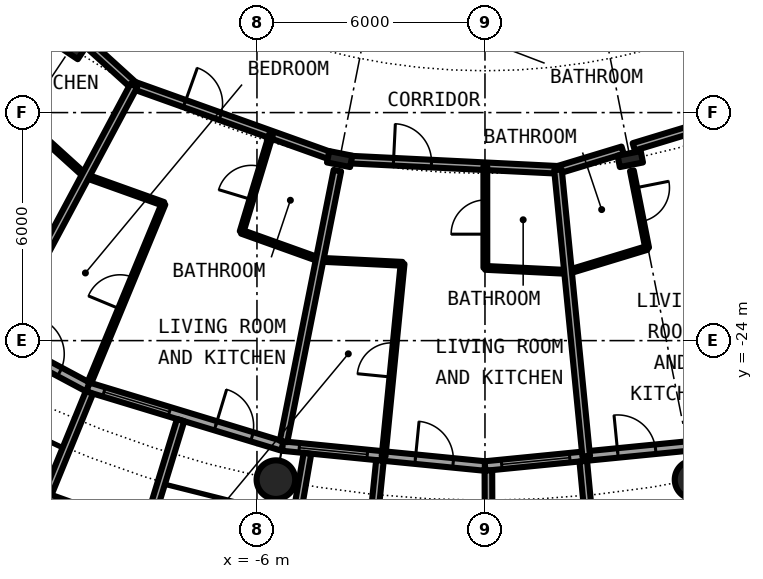
"""IFC4 building model, lengths in metres.
Left out: names, types, materials, properties, quantities, classifications, styles, units other than length and angle.
Written with IfcOpenShell. Run it as: python <this file> out.ifc"""

import sys

from ifc_helpers import new_model, si_unit, direction, frame, frame_2d, origin, origin_2d, place, context, subcontext, project, spatial, rectangle, circle, hollow_circle, i_section, extrude, element, fill, save


model = new_model("IFC4")
c1 = context("Model", 3, precision=1e-05, world=origin(), true_north=direction((0.0, 1.0)))
c2 = subcontext(c1, "Body", "Model", "MODEL_VIEW")
j1 = project(units=[si_unit("LENGTHUNIT", "METRE"), si_unit("PLANEANGLEUNIT", "RADIAN")], contexts=[c1])
p1 = place(None, origin())
s1 = spatial("IfcSite", under=j1, at=p1, CompositionType="ELEMENT")
p2 = place(p1, origin())
s2 = spatial("IfcBuilding", under=s1, at=p2, CompositionType="ELEMENT")
p3 = place(p2, frame((0.0, 0.0, 41.1)))
s3 = spatial("IfcBuildingStorey", under=s2, at=p3, CompositionType="ELEMENT", Elevation=41.1)
for number, where, z_axis, x_axis in (
    (1, (-5.501, -27.658, 0.0), (0.0, 0.0, 1.0), (1.0, 0.0, 0.0)),
    (2, (5.501, -27.658, 0.0), (0.0, 0.0, 1.0), (1.0, 0.0, 0.0)),
):
    element("IfcColumn", number, at=place(p3, frame(where, z_axis=z_axis, x_axis=x_axis)), inside=s3, PredefinedType="COLUMN", context=c2, shape_type="SweptSolid", body=[
        extrude(hollow_circle(Radius=0.508, WallThickness=0.05, at=origin_2d()), origin(), (0.0, 0.0, 1.0), 3.05),
    ])
for number, where, z_axis, x_axis in (
    (3, (-10.889, -16.297, 0.0), (0.0, 0.0, 1.0), (-0.556, -0.831, 0.0)),
    (4, (-3.824, -19.223, 0.0), (0.0, 0.0, 1.0), (-0.195, -0.981, 0.0)),
    (5, (3.824, -19.223, 0.0), (0.0, 0.0, 1.0), (0.195, -0.981, 0.0)),
):
    element("IfcColumn", number, at=place(p3, frame(where, z_axis=z_axis, x_axis=x_axis)), inside=s3, PredefinedType="COLUMN", context=c2, shape_type="SweptSolid", body=[
        extrude(i_section(OverallWidth=0.305, OverallDepth=0.62, WebThickness=0.021, FlangeThickness=0.04, FilletRadius=0.027, at=origin_2d()), origin(), (0.0, 0.0, 1.0), 3.05),
    ])
p4 = place(p3, frame((-15.167, -22.699, 0.0), z_axis=(0.0, 0.0, 1.0), x_axis=(0.881915646801, -0.471407246368, 0.0)))
e6 = element("IfcWall", 6, at=p4, inside=s3, PredefinedType="SOLIDWALL", context=c2, shape_type="SweptSolid", body=[
    extrude(rectangle(XDim=5.352, YDim=0.25, at=frame_2d((2.676, 0.0))), origin(), (0.0, 0.0, 1.0), 2.7),
])
p5 = place(p4, frame((0.441, 0.0, 0.3)))
e7 = element("IfcOpeningElement", 7, at=p5, cuts=e6, PredefinedType="OPENING", context=c2, shape_type="SweptSolid", body=[
    extrude(rectangle(XDim=1.8, YDim=2.1, at=frame_2d((0.9, 1.05))), frame((0.0, 0.135, 0.0), z_axis=(0.0, -1.0, 0.0), x_axis=(1.0, 0.0, 0.0)), (0.0, 0.0, 1.0), 0.27),
])
p6 = place(p4, frame((3.51, 0.0, 0.0)))
e8 = element("IfcOpeningElement", 8, at=p6, cuts=e6, PredefinedType="OPENING", context=c2, shape_type="SweptSolid", body=[
    extrude(rectangle(XDim=1.0, YDim=2.2, at=frame_2d((0.5, 1.1))), frame((0.0, 0.135, 0.0), z_axis=(0.0, -1.0, 0.0), x_axis=(1.0, 0.0, 0.0)), (0.0, 0.0, 1.0), 0.27),
])
p7 = place(p3, frame((-10.447, -25.222, 0.0), z_axis=(0.0, 0.0, 1.0), x_axis=(0.956965678721, -0.290201119486, 0.0)))
e9 = element("IfcWall", 9, at=p7, inside=s3, PredefinedType="SOLIDWALL", context=c2, shape_type="SweptSolid", body=[
    extrude(rectangle(XDim=5.351, YDim=0.25, at=frame_2d((2.676, 0.0))), origin(), (0.0, 0.0, 1.0), 2.7),
])
p8 = place(p7, frame((0.441, 0.0, 0.3)))
e10 = element("IfcOpeningElement", 10, at=p8, cuts=e9, PredefinedType="OPENING", context=c2, shape_type="SweptSolid", body=[
    extrude(rectangle(XDim=1.8, YDim=2.1, at=frame_2d((0.9, 1.05))), frame((0.0, 0.135, 0.0), z_axis=(0.0, -1.0, 0.0), x_axis=(1.0, 0.0, 0.0)), (0.0, 0.0, 1.0), 0.27),
])
p9 = place(p7, frame((3.51, 0.0, 0.0)))
e11 = element("IfcOpeningElement", 11, at=p9, cuts=e9, PredefinedType="OPENING", context=c2, shape_type="SweptSolid", body=[
    extrude(rectangle(XDim=1.0, YDim=2.2, at=frame_2d((0.5, 1.1))), frame((0.0, 0.135, 0.0), z_axis=(0.0, -1.0, 0.0), x_axis=(1.0, 0.0, 0.0)), (0.0, 0.0, 1.0), 0.27),
])
p10 = place(p3, frame((-11.638, -28.084, -0.03), z_axis=(0.0, 0.0, 1.0), x_axis=(0.941461077774, -0.337121697664, 0.0)))
e12 = element("IfcWall", 12, at=p10, inside=s3, PredefinedType="SOLIDWALL", context=c2, shape_type="SweptSolid", body=[
    extrude(rectangle(XDim=2.993, YDim=0.2, at=frame_2d((1.497, 0.0))), origin(), (0.0, 0.0, 1.0), 2.73),
])
p11 = place(p10, frame((0.457, 0.0, 0.33)))
e13 = element("IfcOpeningElement", 13, at=p11, cuts=e12, PredefinedType="OPENING", context=c2, shape_type="SweptSolid", body=[
    extrude(circle(Radius=1.04, at=frame_2d((1.04, 1.04))), frame((0.0, 0.11, 0.0), z_axis=(0.0, -1.0, 0.0), x_axis=(1.0, 0.0, 0.0)), (0.0, 0.0, 1.0), 0.22),
])
p12 = place(p3, frame((-10.409, -25.364, -0.03), z_axis=(0.0, 0.0, 1.0), x_axis=(-0.379509886562, -0.925187681501, 0.0)))
e14 = element("IfcWall", 14, at=p12, inside=s3, PredefinedType="SOLIDWALL", context=c2, shape_type="SweptSolid", body=[
    extrude(rectangle(XDim=2.883, YDim=0.2, at=frame_2d((1.441, 0.0))), origin(), (0.0, 0.0, 1.0), 2.73),
])
p13 = place(p3, frame((-8.009, -26.092, -0.03), z_axis=(0.0, 0.0, 1.0), x_axis=(-0.293406695073, -0.955987715029, 0.0)))
e15 = element("IfcWall", 15, at=p13, inside=s3, PredefinedType="SOLIDWALL", context=c2, shape_type="SweptSolid", body=[
    extrude(rectangle(XDim=3.006, YDim=0.2, at=frame_2d((1.503, 0.0))), origin(), (0.0, 0.0, 1.0), 2.73),
])
p14 = place(p3, frame((-5.326, -26.775, 0.0), z_axis=(0.0, 0.0, 1.0), x_axis=(0.995173996315, -0.098126026407, 0.0)))
e16 = element("IfcWall", 16, at=p14, inside=s3, PredefinedType="SOLIDWALL", context=c2, shape_type="SweptSolid", body=[
    extrude(rectangle(XDim=5.352, YDim=0.25, at=frame_2d((2.676, 0.0))), origin(), (0.0, 0.0, 1.0), 2.7),
])
p15 = place(p14, frame((0.441, 0.0, 0.3)))
e17 = element("IfcOpeningElement", 17, at=p15, cuts=e16, PredefinedType="OPENING", context=c2, shape_type="SweptSolid", body=[
    extrude(rectangle(XDim=1.8, YDim=2.1, at=frame_2d((0.9, 1.05))), frame((0.0, 0.135, 0.0), z_axis=(0.0, -1.0, 0.0), x_axis=(1.0, 0.0, 0.0)), (0.0, 0.0, 1.0), 0.27),
])
p16 = place(p14, frame((3.51, 0.0, 0.0)))
e18 = element("IfcOpeningElement", 18, at=p16, cuts=e16, PredefinedType="OPENING", context=c2, shape_type="SweptSolid", body=[
    extrude(rectangle(XDim=1.0, YDim=2.2, at=frame_2d((0.5, 1.1))), frame((0.0, 0.135, 0.0), z_axis=(0.0, -1.0, 0.0), x_axis=(1.0, 0.0, 0.0)), (0.0, 0.0, 1.0), 0.27),
])
p17 = place(p3, frame((-4.671, -26.966, -0.03), z_axis=(0.0, 0.0, 1.0), x_axis=(-0.170539878907, -0.985350774954, 0.0)))
e19 = element("IfcWall", 19, at=p17, inside=s3, PredefinedType="SOLIDWALL", context=c2, shape_type="SweptSolid", body=[
    extrude(rectangle(XDim=2.932, YDim=0.2, at=frame_2d((1.466, 0.0))), origin(), (0.0, 0.0, 1.0), 2.73),
])
p18 = place(p3, frame((-2.764, -27.153, -0.03), z_axis=(0.0, 0.0, 1.0), x_axis=(-0.101505487237, -0.994834979311, 0.0)))
e20 = element("IfcWall", 20, at=p18, inside=s3, PredefinedType="SOLIDWALL", context=c2, shape_type="SweptSolid", body=[
    extrude(rectangle(XDim=3.007, YDim=0.2, at=frame_2d((1.503, 0.0))), origin(), (0.0, 0.0, 1.0), 2.73),
])
p19 = place(p3, frame((0.0, -27.3, 0.0), z_axis=(0.0, 0.0, 1.0), x_axis=(0.995173996315, 0.098126026407, 0.0)))
e21 = element("IfcWall", 21, at=p19, inside=s3, PredefinedType="SOLIDWALL", context=c2, shape_type="SweptSolid", body=[
    extrude(rectangle(XDim=5.352, YDim=0.25, at=frame_2d((2.676, 0.0))), origin(), (0.0, 0.0, 1.0), 2.7),
])
p20 = place(p19, frame((0.441, 0.0, 0.3)))
e22 = element("IfcOpeningElement", 22, at=p20, cuts=e21, PredefinedType="OPENING", context=c2, shape_type="SweptSolid", body=[
    extrude(rectangle(XDim=1.8, YDim=2.1, at=frame_2d((0.9, 1.05))), frame((0.0, 0.135, 0.0), z_axis=(0.0, -1.0, 0.0), x_axis=(1.0, 0.0, 0.0)), (0.0, 0.0, 1.0), 0.27),
])
p21 = place(p19, frame((3.51, 0.0, 0.0)))
e23 = element("IfcOpeningElement", 23, at=p21, cuts=e21, PredefinedType="OPENING", context=c2, shape_type="SweptSolid", body=[
    extrude(rectangle(XDim=1.0, YDim=2.2, at=frame_2d((0.5, 1.1))), frame((0.0, 0.135, 0.0), z_axis=(0.0, -1.0, 0.0), x_axis=(1.0, 0.0, 0.0)), (0.0, 0.0, 1.0), 0.27),
])
p22 = place(p3, frame((0.09, -27.417, -0.03), z_axis=(0.0, 0.0, 1.0), x_axis=(0.00347308367, -0.999993968827, 0.0)))
e24 = element("IfcWall", 24, at=p22, inside=s3, PredefinedType="SOLIDWALL", context=c2, shape_type="SweptSolid", body=[
    extrude(rectangle(XDim=2.882, YDim=0.2, at=frame_2d((1.441, 0.0))), origin(), (0.0, 0.0, 1.0), 2.73),
])
p23 = place(p3, frame((2.586, -27.171, -0.03), z_axis=(0.0, 0.0, 1.0), x_axis=(0.094548432284, -0.995520262954, 0.0)))
e25 = element("IfcWall", 25, at=p23, inside=s3, PredefinedType="SOLIDWALL", context=c2, shape_type="SweptSolid", body=[
    extrude(rectangle(XDim=3.006, YDim=0.2, at=frame_2d((1.503, 0.0))), origin(), (0.0, 0.0, 1.0), 2.73),
])
p24 = place(p3, frame((-10.512, -19.667, 0.0), z_axis=(0.0, 0.0, 1.0), x_axis=(0.94151635689, -0.336967282847, 0.0)))
e26 = element("IfcWall", 26, at=p24, inside=s3, PredefinedType="PARTITIONING", context=c2, shape_type="SweptSolid", body=[
    extrude(rectangle(XDim=2.182, YDim=0.1, at=frame_2d((1.091, 0.0))), origin(), (0.0, 0.0, 1.0), 2.7),
])
p25 = place(p3, frame((-6.401, -21.138, 0.0), z_axis=(0.0, 0.0, 1.0), x_axis=(0.941465495635, -0.337109359895, 0.0)))
e27 = element("IfcWall", 27, at=p25, inside=s3, PredefinedType="PARTITIONING", context=c2, shape_type="SweptSolid", body=[
    extrude(rectangle(XDim=2.181, YDim=0.1, at=frame_2d((1.09, 0.0))), origin(), (0.0, 0.0, 1.0), 2.7),
])
for number, where, z_axis, x_axis in (
    (28, (-4.351, -21.872, 0.0), (0.0, 0.0, 1.0), (0.999, -0.049, 0.0)),
    (29, (0.007, -22.086, 0.0), (0.0, 0.0, 1.0), (0.999, -0.049, 0.0)),
):
    element("IfcWall", number, at=place(p3, frame(where, z_axis=z_axis, x_axis=x_axis)), inside=s3, PredefinedType="PARTITIONING", context=c2, shape_type="SweptSolid", body=[
        extrude(rectangle(XDim=2.182, YDim=0.1, at=frame_2d((1.091, 0.0))), origin(), (0.0, 0.0, 1.0), 2.7),
    ])
p26 = place(p3, frame((2.18, -22.195, 0.0), z_axis=(0.0, 0.0, 1.0), x_axis=(0.956838221976, 0.290621088303, 0.0)))
e30 = element("IfcWall", 30, at=p26, inside=s3, PredefinedType="PARTITIONING", context=c2, shape_type="SweptSolid", body=[
    extrude(rectangle(XDim=2.175, YDim=0.1, at=frame_2d((1.087, 0.0))), origin(), (0.0, 0.0, 1.0), 2.7),
])
p27 = place(p3, frame((-13.727, -16.754, 0.0), z_axis=(0.0, 0.0, 1.0), x_axis=(0.740840803797, -0.671680655839, 0.0)))
e31 = element("IfcWall", 31, at=p27, inside=s3, PredefinedType="PARTITIONING", context=c2, shape_type="SweptSolid", body=[
    extrude(rectangle(XDim=4.338, YDim=0.1, at=frame_2d((2.169, 0.0))), origin(), (0.0, 0.0, 1.0), 2.7),
])
p28 = place(p3, frame((-9.239, -17.286, 0.0), z_axis=(0.0, 0.0, 1.0), x_axis=(0.94157995483, -0.336789531699, 0.0)))
e32 = element("IfcWall", 32, at=p28, inside=s3, PredefinedType="PARTITIONING", context=c2, shape_type="SweptSolid", body=[
    extrude(rectangle(XDim=5.597, YDim=0.2, at=frame_2d((2.798, 0.0))), origin(), (0.0, 0.0, 1.0), 2.38),
])
p29 = place(p28, frame((1.417, 0.0, 0.0)))
e33 = element("IfcOpeningElement", 33, at=p29, cuts=e32, PredefinedType="OPENING", context=c2, shape_type="SweptSolid", body=[
    extrude(rectangle(XDim=1.0, YDim=2.3, at=frame_2d((0.5, 1.15))), frame((0.0, 0.11, 0.0), z_axis=(0.0, -1.0, 0.0), x_axis=(1.0, 0.0, 0.0)), (0.0, 0.0, 1.0), 0.22),
])
p30 = place(p3, frame((-3.67, -19.231, 0.0), z_axis=(0.0, 0.0, 1.0), x_axis=(0.99879118777, -0.049154483346, 0.0)))
e34 = element("IfcWall", 34, at=p30, inside=s3, PredefinedType="PARTITIONING", context=c2, shape_type="SweptSolid", body=[
    extrude(rectangle(XDim=5.598, YDim=0.2, at=frame_2d((2.799, 0.0))), origin(), (0.0, 0.0, 1.0), 2.38),
])
p31 = place(p30, frame((1.264, 0.0, 0.0)))
e35 = element("IfcOpeningElement", 35, at=p31, cuts=e34, PredefinedType="OPENING", context=c2, shape_type="SweptSolid", body=[
    extrude(rectangle(XDim=1.0, YDim=2.3, at=frame_2d((0.5, 1.15))), frame((0.0, 0.11, 0.0), z_axis=(0.0, -1.0, 0.0), x_axis=(1.0, 0.0, 0.0)), (0.0, 0.0, 1.0), 0.22),
])
p32 = place(p3, frame((1.921, -19.506, 0.0), z_axis=(0.0, 0.0, 1.0), x_axis=(0.956929641646, 0.290319928594, 0.0)))
e36 = element("IfcWall", 36, at=p32, inside=s3, PredefinedType="PARTITIONING", context=c2, shape_type="SweptSolid", body=[
    extrude(rectangle(XDim=1.778, YDim=0.2, at=frame_2d((0.889, 0.0))), origin(), (0.0, 0.0, 1.0), 2.38),
])
p33 = place(p3, frame((3.915, -18.901, 0.0), z_axis=(0.0, 0.0, 1.0), x_axis=(0.956941324682, 0.290281417103, 0.0)))
e37 = element("IfcWall", 37, at=p33, inside=s3, PredefinedType="PARTITIONING", context=c2, shape_type="SweptSolid", body=[
    extrude(rectangle(XDim=5.563, YDim=0.2, at=frame_2d((2.782, 0.0))), origin(), (0.0, 0.0, 1.0), 2.38),
])
p34 = place(p33, frame((2.196, 0.0, 0.0)))
e38 = element("IfcOpeningElement", 38, at=p34, cuts=e37, PredefinedType="OPENING", context=c2, shape_type="SweptSolid", body=[
    extrude(rectangle(XDim=1.0, YDim=2.3, at=frame_2d((0.5, 1.15))), frame((0.0, 0.11, 0.0), z_axis=(0.0, -1.0, 0.0), x_axis=(1.0, 0.0, 0.0)), (0.0, 0.0, 1.0), 0.22),
])
p35 = place(p3, frame((-16.179, -10.994, 0.0), z_axis=(0.0, 0.0, 1.0), x_axis=(0.740659568799, -0.671880497668, 0.0)))
e39 = element("IfcWall", 39, at=p35, inside=s3, PredefinedType="PARTITIONING", context=c2, shape_type="SweptSolid", body=[
    extrude(rectangle(XDim=9.36, YDim=0.2, at=frame_2d((4.68, 0.0))), origin(), (0.0, 0.0, 1.0), 2.38),
])
p36 = place(p35, frame((4.105, 0.0, 0.0)))
e40 = element("IfcOpeningElement", 40, at=p36, cuts=e39, PredefinedType="OPENING", context=c2, shape_type="SweptSolid", body=[
    extrude(rectangle(XDim=1.0, YDim=2.3, at=frame_2d((0.5, 1.15))), frame((0.0, 0.11, 0.0), z_axis=(0.0, -1.0, 0.0), x_axis=(1.0, 0.0, 0.0)), (0.0, 0.0, 1.0), 0.22),
])
p37 = place(p3, frame((-12.81, -23.966, 0.0), z_axis=(0.0, 0.0, 1.0), x_axis=(0.471439510802, 0.881898399848, 0.0)))
e41 = element("IfcWall", 41, at=p37, inside=s3, PredefinedType="PARTITIONING", context=c2, shape_type="SweptSolid", body=[
    extrude(rectangle(XDim=7.575, YDim=0.2, at=frame_2d((3.787, 0.0))), origin(), (0.0, 0.0, 1.0), 2.7),
])
p38 = place(p3, frame((-10.407, -25.103, 0.0), z_axis=(0.0, 0.0, 1.0), x_axis=(0.382983071721, 0.923755360891, 0.0)))
e42 = element("IfcWall", 42, at=p38, inside=s3, PredefinedType="PARTITIONING", context=c2, shape_type="SweptSolid", body=[
    extrude(rectangle(XDim=5.089, YDim=0.1, at=frame_2d((2.544, 0.0))), origin(), (0.0, 0.0, 1.0), 2.7),
])
p39 = place(p38, frame((2.095, 0.0, 0.0)))
e43 = element("IfcOpeningElement", 43, at=p39, cuts=e42, PredefinedType="OPENING", context=c2, shape_type="SweptSolid", body=[
    extrude(rectangle(XDim=0.9, YDim=2.3, at=frame_2d((0.45, 1.15))), frame((0.0, 0.06, 0.0), z_axis=(0.0, -1.0, 0.0), x_axis=(1.0, 0.0, 0.0)), (0.0, 0.0, 1.0), 0.12),
])
p40 = place(p3, frame((-6.404, -21.137, 0.0), z_axis=(0.0, 0.0, 1.0), x_axis=(0.289792063283, 0.957089630107, 0.0)))
e44 = element("IfcWall", 44, at=p40, inside=s3, PredefinedType="PARTITIONING", context=c2, shape_type="SweptSolid", body=[
    extrude(rectangle(XDim=2.675, YDim=0.1, at=frame_2d((1.337, 0.0))), origin(), (0.0, 0.0, 1.0), 2.7),
])
p41 = place(p40, frame((0.887, 0.0, 0.0)))
e45 = element("IfcOpeningElement", 45, at=p41, cuts=e44, PredefinedType="OPENING", context=c2, shape_type="SweptSolid", body=[
    extrude(rectangle(XDim=0.9, YDim=2.3, at=frame_2d((0.45, 1.15))), frame((0.0, 0.06, 0.0), z_axis=(0.0, -1.0, 0.0), x_axis=(1.0, 0.0, 0.0)), (0.0, 0.0, 1.0), 0.12),
])
p42 = place(p3, frame((-5.301, -26.653, 0.0), z_axis=(0.0, 0.0, 1.0), x_axis=(0.195056101659, 0.980792086635, 0.0)))
e46 = element("IfcWall", 46, at=p42, inside=s3, PredefinedType="PARTITIONING", context=c2, shape_type="SweptSolid", body=[
    extrude(rectangle(XDim=7.265, YDim=0.2, at=frame_2d((3.632, 0.0))), origin(), (0.0, 0.0, 1.0), 2.7),
])
p43 = place(p3, frame((-2.668, -27.043, 0.0), z_axis=(0.0, 0.0, 1.0), x_axis=(0.098259061871, 0.99516086979, 0.0)))
e47 = element("IfcWall", 47, at=p43, inside=s3, PredefinedType="PARTITIONING", context=c2, shape_type="SweptSolid", body=[
    extrude(rectangle(XDim=5.089, YDim=0.1, at=frame_2d((2.544, 0.0))), origin(), (0.0, 0.0, 1.0), 2.7),
])
p44 = place(p43, frame((2.094, 0.0, 0.0)))
e48 = element("IfcOpeningElement", 48, at=p44, cuts=e47, PredefinedType="OPENING", context=c2, shape_type="SweptSolid", body=[
    extrude(rectangle(XDim=0.9, YDim=2.3, at=frame_2d((0.45, 1.15))), frame((0.0, 0.06, 0.0), z_axis=(0.0, -1.0, 0.0), x_axis=(1.0, 0.0, 0.0)), (0.0, 0.0, 1.0), 0.12),
])
p45 = place(p3, frame((0.01, -22.086, 0.0), z_axis=(0.0, 0.0, 1.0), x_axis=(-0.000365230071, 0.999999933303, 0.0)))
e49 = element("IfcWall", 49, at=p45, inside=s3, PredefinedType="PARTITIONING", context=c2, shape_type="SweptSolid", body=[
    extrude(rectangle(XDim=2.674, YDim=0.1, at=frame_2d((1.337, 0.0))), origin(), (0.0, 0.0, 1.0), 2.7),
])
p46 = place(p45, frame((0.887, 0.0, 0.0)))
e50 = element("IfcOpeningElement", 50, at=p46, cuts=e49, PredefinedType="OPENING", context=c2, shape_type="SweptSolid", body=[
    extrude(rectangle(XDim=0.9, YDim=2.3, at=frame_2d((0.45, 1.15))), frame((0.0, 0.06, 0.0), z_axis=(0.0, -1.0, 0.0), x_axis=(1.0, 0.0, 0.0)), (0.0, 0.0, 1.0), 0.12),
])
p47 = place(p3, frame((1.921, -19.506, 0.0), z_axis=(0.0, 0.0, 1.0), x_axis=(0.098115395479, -0.995175044487, 0.0)))
e51 = element("IfcWall", 51, at=p47, inside=s3, PredefinedType="PARTITIONING", context=c2, shape_type="SweptSolid", body=[
    extrude(rectangle(XDim=7.574, YDim=0.2, at=frame_2d((3.787, 0.0))), origin(), (0.0, 0.0, 1.0), 2.7),
])
p48 = place(p3, frame((3.866, -19.531, 0.0), z_axis=(0.0, 0.0, 1.0), x_axis=(0.193846698927, -0.981031832977, 0.0)))
e52 = element("IfcWall", 52, at=p48, inside=s3, PredefinedType="PARTITIONING", context=c2, shape_type="SweptSolid", body=[
    extrude(rectangle(XDim=2.069, YDim=0.1, at=frame_2d((1.035, 0.0))), origin(), (0.0, 0.0, 1.0), 2.7),
])
p49 = place(p48, frame((0.459, 0.0, 0.0)))
e53 = element("IfcOpeningElement", 53, at=p49, cuts=e52, PredefinedType="OPENING", context=c2, shape_type="SweptSolid", body=[
    extrude(rectangle(XDim=0.9, YDim=2.3, at=frame_2d((0.45, 1.15))), frame((0.0, 0.06, 0.0), z_axis=(0.0, -1.0, 0.0), x_axis=(1.0, 0.0, 0.0)), (0.0, 0.0, 1.0), 0.12),
])
p50 = place(p6, origin())
e54 = element("IfcDoor", 54, at=p50, inside=s3, OperationType="SINGLE_SWING_LEFT", PredefinedType="DOOR", context=c2, shape_type="SweptSolid", body=[
    extrude(rectangle(XDim=1.0, YDim=2.2, at=frame_2d((0.5, 1.1))), frame((0.0, 0.025, 0.0), z_axis=(0.0, -1.0, 0.0), x_axis=(1.0, 0.0, 0.0)), (0.0, 0.0, 1.0), 0.05),
])
fill(e8, e54)
p51 = place(p8, origin())
e55 = element("IfcWindow", 55, at=p51, inside=s3, PartitioningType="SINGLE_PANEL", PredefinedType="WINDOW", context=c2, shape_type="SweptSolid", body=[
    extrude(rectangle(XDim=1.8, YDim=2.1, at=frame_2d((0.9, 1.05))), frame((0.0, 0.03, 0.0), z_axis=(0.0, -1.0, 0.0), x_axis=(1.0, 0.0, 0.0)), (0.0, 0.0, 1.0), 0.06),
])
fill(e10, e55)
p52 = place(p9, origin())
e56 = element("IfcDoor", 56, at=p52, inside=s3, OperationType="SINGLE_SWING_LEFT", PredefinedType="DOOR", context=c2, shape_type="SweptSolid", body=[
    extrude(rectangle(XDim=1.0, YDim=2.2, at=frame_2d((0.5, 1.1))), frame((0.0, 0.025, 0.0), z_axis=(0.0, -1.0, 0.0), x_axis=(1.0, 0.0, 0.0)), (0.0, 0.0, 1.0), 0.05),
])
fill(e11, e56)
p53 = place(p15, origin())
e57 = element("IfcWindow", 57, at=p53, inside=s3, PartitioningType="SINGLE_PANEL", PredefinedType="WINDOW", context=c2, shape_type="SweptSolid", body=[
    extrude(rectangle(XDim=1.8, YDim=2.1, at=frame_2d((0.9, 1.05))), frame((0.0, 0.03, 0.0), z_axis=(0.0, -1.0, 0.0), x_axis=(1.0, 0.0, 0.0)), (0.0, 0.0, 1.0), 0.06),
])
fill(e17, e57)
p54 = place(p16, origin())
e58 = element("IfcDoor", 58, at=p54, inside=s3, OperationType="SINGLE_SWING_LEFT", PredefinedType="DOOR", context=c2, shape_type="SweptSolid", body=[
    extrude(rectangle(XDim=1.0, YDim=2.2, at=frame_2d((0.5, 1.1))), frame((0.0, 0.025, 0.0), z_axis=(0.0, -1.0, 0.0), x_axis=(1.0, 0.0, 0.0)), (0.0, 0.0, 1.0), 0.05),
])
fill(e18, e58)
p55 = place(p20, origin())
e59 = element("IfcWindow", 59, at=p55, inside=s3, PartitioningType="SINGLE_PANEL", PredefinedType="WINDOW", context=c2, shape_type="SweptSolid", body=[
    extrude(rectangle(XDim=1.8, YDim=2.1, at=frame_2d((0.9, 1.05))), frame((0.0, 0.03, 0.0), z_axis=(0.0, -1.0, 0.0), x_axis=(1.0, 0.0, 0.0)), (0.0, 0.0, 1.0), 0.06),
])
fill(e22, e59)
p56 = place(p21, origin())
e60 = element("IfcDoor", 60, at=p56, inside=s3, OperationType="SINGLE_SWING_LEFT", PredefinedType="DOOR", context=c2, shape_type="SweptSolid", body=[
    extrude(rectangle(XDim=1.0, YDim=2.2, at=frame_2d((0.5, 1.1))), frame((0.0, 0.025, 0.0), z_axis=(0.0, -1.0, 0.0), x_axis=(1.0, 0.0, 0.0)), (0.0, 0.0, 1.0), 0.05),
])
fill(e23, e60)
p57 = place(p29, origin())
e61 = element("IfcDoor", 61, at=p57, inside=s3, OperationType="SINGLE_SWING_LEFT", PredefinedType="DOOR", context=c2, shape_type="SweptSolid", body=[
    extrude(rectangle(XDim=1.0, YDim=2.3, at=frame_2d((0.5, 1.15))), frame((0.0, 0.025, 0.0), z_axis=(0.0, -1.0, 0.0), x_axis=(1.0, 0.0, 0.0)), (0.0, 0.0, 1.0), 0.05),
])
fill(e33, e61)
p58 = place(p41, origin())
e62 = element("IfcDoor", 62, at=p58, inside=s3, OperationType="SINGLE_SWING_RIGHT", PredefinedType="DOOR", context=c2, shape_type="SweptSolid", body=[
    extrude(rectangle(XDim=0.9, YDim=2.3, at=frame_2d((0.45, 1.15))), frame((0.0, 0.025, 0.0), z_axis=(0.0, -1.0, 0.0), x_axis=(1.0, 0.0, 0.0)), (0.0, 0.0, 1.0), 0.05),
])
fill(e45, e62)
p59 = place(p39, origin())
e63 = element("IfcDoor", 63, at=p59, inside=s3, OperationType="SINGLE_SWING_RIGHT", PredefinedType="DOOR", context=c2, shape_type="SweptSolid", body=[
    extrude(rectangle(XDim=0.9, YDim=2.3, at=frame_2d((0.45, 1.15))), frame((0.0, 0.025, 0.0), z_axis=(0.0, -1.0, 0.0), x_axis=(1.0, 0.0, 0.0)), (0.0, 0.0, 1.0), 0.05),
])
fill(e43, e63)
p60 = place(p31, origin())
e64 = element("IfcDoor", 64, at=p60, inside=s3, OperationType="SINGLE_SWING_LEFT", PredefinedType="DOOR", context=c2, shape_type="SweptSolid", body=[
    extrude(rectangle(XDim=1.0, YDim=2.3, at=frame_2d((0.5, 1.15))), frame((0.0, 0.025, 0.0), z_axis=(0.0, -1.0, 0.0), x_axis=(1.0, 0.0, 0.0)), (0.0, 0.0, 1.0), 0.05),
])
fill(e35, e64)
p61 = place(p46, origin())
e65 = element("IfcDoor", 65, at=p61, inside=s3, OperationType="SINGLE_SWING_RIGHT", PredefinedType="DOOR", context=c2, shape_type="SweptSolid", body=[
    extrude(rectangle(XDim=0.9, YDim=2.3, at=frame_2d((0.45, 1.15))), frame((0.0, 0.025, 0.0), z_axis=(0.0, -1.0, 0.0), x_axis=(1.0, 0.0, 0.0)), (0.0, 0.0, 1.0), 0.05),
])
fill(e50, e65)
p62 = place(p44, origin())
e66 = element("IfcDoor", 66, at=p62, inside=s3, OperationType="SINGLE_SWING_LEFT", PredefinedType="DOOR", context=c2, shape_type="SweptSolid", body=[
    extrude(rectangle(XDim=0.9, YDim=2.3, at=frame_2d((0.45, 1.15))), frame((0.0, 0.025, 0.0), z_axis=(0.0, -1.0, 0.0), x_axis=(1.0, 0.0, 0.0)), (0.0, 0.0, 1.0), 0.05),
])
fill(e48, e66)
p63 = place(p49, origin())
e67 = element("IfcDoor", 67, at=p63, inside=s3, OperationType="SINGLE_SWING_LEFT", PredefinedType="DOOR", context=c2, shape_type="SweptSolid", body=[
    extrude(rectangle(XDim=0.9, YDim=2.3, at=frame_2d((0.45, 1.15))), frame((0.0, 0.025, 0.0), z_axis=(0.0, -1.0, 0.0), x_axis=(1.0, 0.0, 0.0)), (0.0, 0.0, 1.0), 0.05),
])
fill(e53, e67)
save(model, sys.argv[1])
